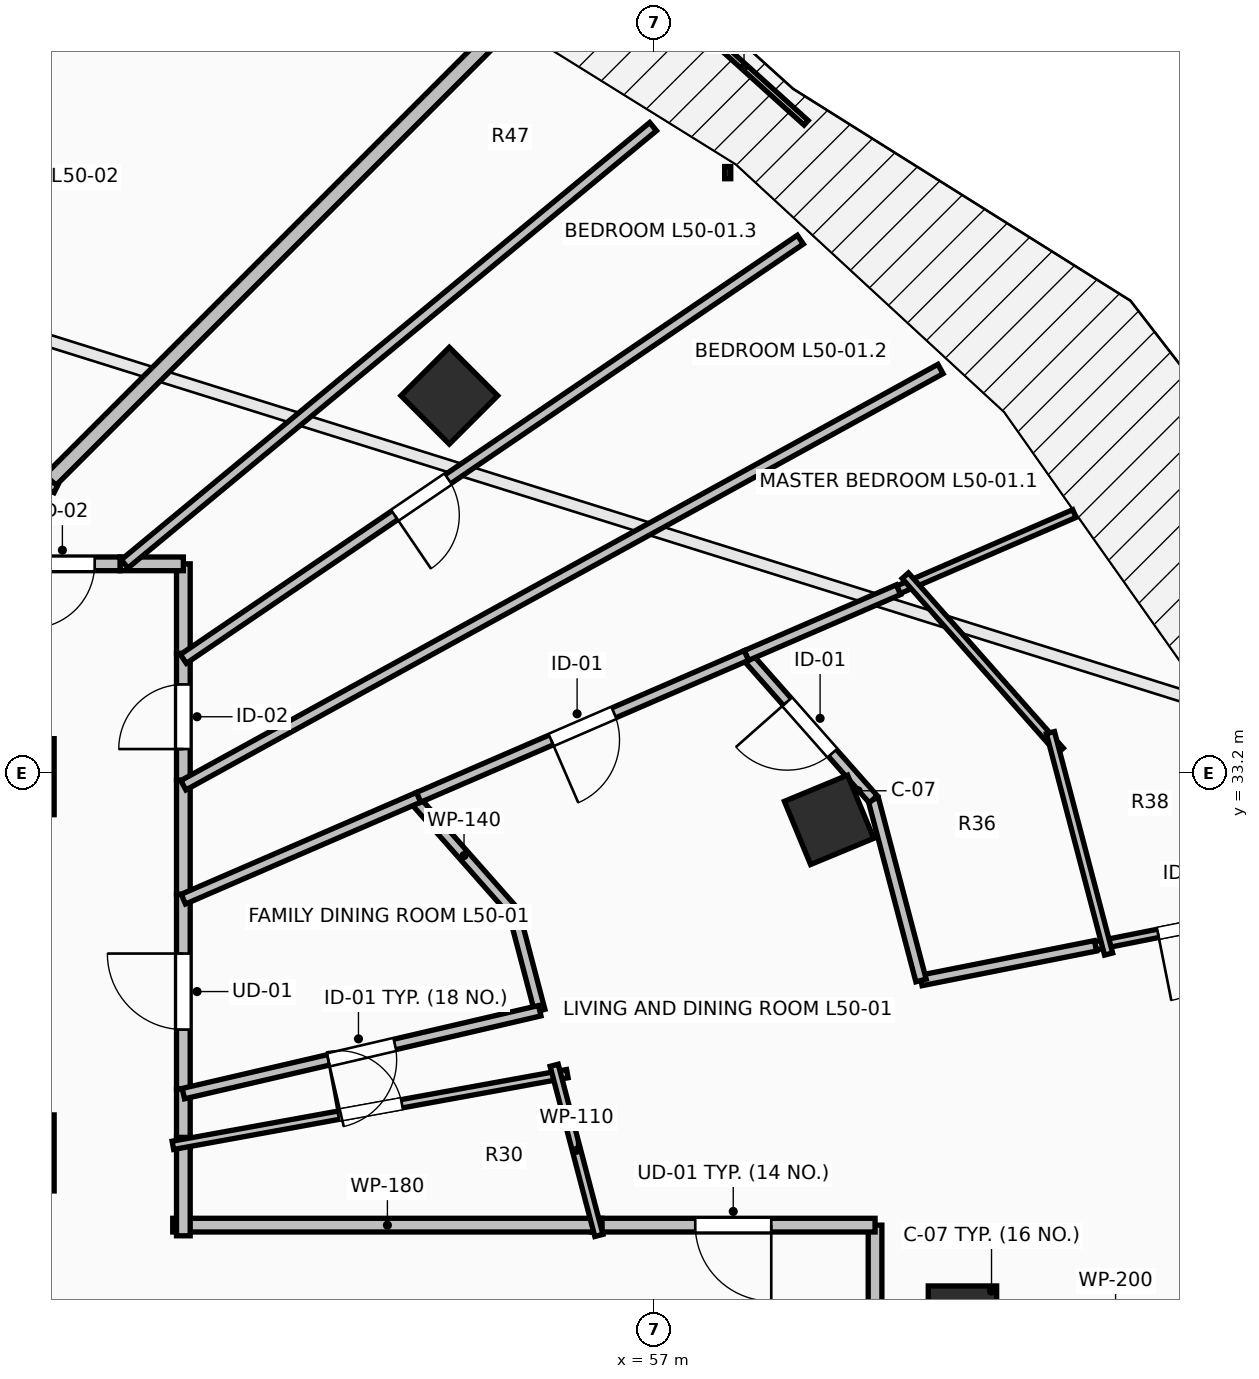
"""IFC4 building model, lengths in metres.
Left out: names, types, materials, properties, quantities, classifications, styles, units other than length and angle.
Written with IfcOpenShell. Run it as: python <this file> out.ifc"""

import sys

from ifc_helpers import new_model, si_unit, direction, frame, frame_2d, origin, origin_2d, place, context, subcontext, project, spatial, rectangle, extrude, element, fill, save


model = new_model("IFC4")
c1 = context("Model", 3, precision=1e-05, world=origin(), true_north=direction((0.0, 1.0)))
c2 = subcontext(c1, "Body", "Model", "MODEL_VIEW")
j1 = project(units=[si_unit("LENGTHUNIT", "METRE"), si_unit("PLANEANGLEUNIT", "RADIAN")], contexts=[c1])
p1 = place(None, origin())
s1 = spatial("IfcSite", under=j1, at=p1, CompositionType="ELEMENT")
p2 = place(p1, origin())
s2 = spatial("IfcBuilding", under=s1, at=p2, CompositionType="ELEMENT")
p3 = place(p2, frame((0.0, 0.0, 186.1)))
s3 = spatial("IfcBuildingStorey", under=s2, at=p3, CompositionType="ELEMENT", Elevation=186.1)
for number, where, z_axis, x_axis in (
    (1, (61.05, 26.0, 0.0), (0.0, 0.0, 1.0), (1.0, 0.0, 0.0)),
    (2, (59.295, 32.582, 0.0), (0.0, 0.0, 1.0), (0.924, 0.383, 0.0)),
    (3, (54.299, 38.162, 0.0), (0.0, 0.0, 1.0), (0.707, 0.707, 0.0)),
):
    element("IfcColumn", number, at=place(p3, frame(where, z_axis=z_axis, x_axis=x_axis)), inside=s3, PredefinedType="COLUMN", context=c2, shape_type="SweptSolid", body=[
        extrude(rectangle(XDim=0.9, YDim=0.9, at=origin_2d()), origin(), (0.0, 0.0, 1.0), 3.5),
    ])
for number, where, z_axis, x_axis in (
    (4, (48.75, 33.15, 0.0), (0.0, 0.0, 1.0), (1.0, 0.0, 0.0)),
    (5, (48.75, 28.2, 0.0), (0.0, 0.0, 1.0), (1.0, 0.0, 0.0)),
):
    element("IfcColumn", number, at=place(p3, frame(where, z_axis=z_axis, x_axis=x_axis)), inside=s3, PredefinedType="PILASTER", context=c2, shape_type="SweptSolid", body=[
        extrude(rectangle(XDim=0.7, YDim=1.0, at=origin_2d()), origin(), (0.0, 0.0, 1.0), 3.5),
    ])
p4 = place(p3, frame((59.9, 25.94, 0.0), z_axis=(0.0, 0.0, 1.0), x_axis=(0.0, 1.0, 0.0)))
e6 = element("IfcWall", 6, at=p4, inside=s3, PredefinedType="PARTITIONING", context=c2, shape_type="SweptSolid", body=[
    extrude(rectangle(XDim=1.31, YDim=0.18, at=frame_2d((0.655, 0.0))), origin(), (0.0, 0.0, 1.0), 2.432),
])
p5 = place(p3, frame((59.9, 27.25, 0.0), z_axis=(0.0, 0.0, 1.0), x_axis=(-1.0, 0.0, 0.0)))
e7 = element("IfcWall", 7, at=p5, inside=s3, PredefinedType="PARTITIONING", context=c2, shape_type="SweptSolid", body=[
    extrude(rectangle(XDim=3.731, YDim=0.18, at=frame_2d((1.865, 0.0))), origin(), (0.0, 0.0, 1.0), 2.874),
])
p6 = place(p5, frame((1.365, 0.0, 0.0)))
e8 = element("IfcOpeningElement", 8, at=p6, cuts=e7, PredefinedType="OPENING", context=c2, shape_type="SweptSolid", body=[
    extrude(rectangle(XDim=1.0, YDim=2.15, at=frame_2d((0.5, 1.075))), frame((0.0, 0.105, 0.0), z_axis=(0.0, -1.0, 0.0), x_axis=(1.0, 0.0, 0.0)), (0.0, 0.0, 1.0), 0.21),
])
p7 = place(p3, frame((50.8, 28.265, 0.0), z_axis=(0.0, 0.0, 1.0), x_axis=(0.0, 1.0, 0.0)))
e9 = element("IfcWall", 9, at=p7, inside=s3, PredefinedType="PARTITIONING", context=c2, shape_type="SweptSolid", body=[
    extrude(rectangle(XDim=0.777, YDim=0.18, at=frame_2d((0.389, 0.0))), origin(), (0.0, 0.0, 1.0), 3.24),
])
p8 = place(p3, frame((50.8, 29.042, 0.0), z_axis=(0.0, 0.0, 1.0), x_axis=(0.0, 1.0, 0.0)))
e10 = element("IfcWall", 10, at=p8, inside=s3, PredefinedType="PARTITIONING", context=c2, shape_type="SweptSolid", body=[
    extrude(rectangle(XDim=2.562, YDim=0.18, at=frame_2d((1.281, 0.0))), origin(), (0.0, 0.0, 1.0), 3.24),
])
p9 = place(p8, frame((0.781, 0.0, 0.0)))
e11 = element("IfcOpeningElement", 11, at=p9, cuts=e10, PredefinedType="OPENING", context=c2, shape_type="SweptSolid", body=[
    extrude(rectangle(XDim=1.0, YDim=2.15, at=frame_2d((0.5, 1.075))), frame((0.0, 0.105, 0.0), z_axis=(0.0, -1.0, 0.0), x_axis=(1.0, 0.0, 0.0)), (0.0, 0.0, 1.0), 0.21),
])
p10 = place(p3, frame((56.309, 27.25, 0.0), z_axis=(0.0, 0.0, 1.0), x_axis=(-1.0, 0.0, 0.0)))
e12 = element("IfcWall", 12, at=p10, inside=s3, PredefinedType="PARTITIONING", context=c2, shape_type="SweptSolid", body=[
    extrude(rectangle(XDim=5.649, YDim=0.18, at=frame_2d((2.825, 0.0))), origin(), (0.0, 0.0, 1.0), 2.432),
])
p11 = place(p3, frame((50.8, 27.11, 0.0), z_axis=(0.0, 0.0, 1.0), x_axis=(0.0, 1.0, 0.0)))
e13 = element("IfcWall", 13, at=p11, inside=s3, PredefinedType="PARTITIONING", context=c2, shape_type="SweptSolid", body=[
    extrude(rectangle(XDim=1.295, YDim=0.18, at=frame_2d((0.647, 0.0))), origin(), (0.0, 0.0, 1.0), 2.432),
])
p12 = place(p3, frame((50.8, 31.604, 0.0), z_axis=(0.0, 0.0, 1.0), x_axis=(0.0, 1.0, 0.0)))
e14 = element("IfcWall", 14, at=p12, inside=s3, PredefinedType="PARTITIONING", context=c2, shape_type="SweptSolid", body=[
    extrude(rectangle(XDim=1.501, YDim=0.18, at=frame_2d((0.75, 0.0))), origin(), (0.0, 0.0, 1.0), 2.432),
])
p13 = place(p3, frame((50.8, 33.105, 0.0), z_axis=(0.0, 0.0, 1.0), x_axis=(0.0, 1.0, 0.0)))
e15 = element("IfcWall", 15, at=p13, inside=s3, PredefinedType="PARTITIONING", context=c2, shape_type="SweptSolid", body=[
    extrude(rectangle(XDim=1.667, YDim=0.18, at=frame_2d((0.833, 0.0))), origin(), (0.0, 0.0, 1.0), 2.432),
])
p14 = place(p13, frame((0.408, 0.0, 0.0)))
e16 = element("IfcOpeningElement", 16, at=p14, cuts=e15, PredefinedType="OPENING", context=c2, shape_type="SweptSolid", body=[
    extrude(rectangle(XDim=0.85, YDim=2.1, at=frame_2d((0.425, 1.05))), frame((0.0, 0.105, 0.0), z_axis=(0.0, -1.0, 0.0), x_axis=(1.0, 0.0, 0.0)), (0.0, 0.0, 1.0), 0.21),
])
p15 = place(p3, frame((50.8, 34.772, 0.0), z_axis=(0.0, 0.0, 1.0), x_axis=(0.0, 1.0, 0.0)))
e17 = element("IfcWall", 17, at=p15, inside=s3, PredefinedType="PARTITIONING", context=c2, shape_type="SweptSolid", body=[
    extrude(rectangle(XDim=1.178, YDim=0.18, at=frame_2d((0.589, 0.0))), origin(), (0.0, 0.0, 1.0), 2.432),
])
p16 = place(p3, frame((50.8, 35.95, 0.0), z_axis=(0.0, 0.0, 1.0), x_axis=(-1.0, 0.0, 0.0)))
e18 = element("IfcWall", 18, at=p16, inside=s3, PredefinedType="PARTITIONING", context=c2, shape_type="SweptSolid", body=[
    extrude(rectangle(XDim=0.833, YDim=0.18, at=frame_2d((0.417, 0.0))), origin(), (0.0, 0.0, 1.0), 3.24),
])
p17 = place(p3, frame((49.967, 35.95, 0.0), z_axis=(0.0, 0.0, 1.0), x_axis=(-1.0, 0.0, 0.0)))
e19 = element("IfcWall", 19, at=p17, inside=s3, PredefinedType="PARTITIONING", context=c2, shape_type="SweptSolid", body=[
    extrude(rectangle(XDim=2.077, YDim=0.18, at=frame_2d((1.039, 0.0))), origin(), (0.0, 0.0, 1.0), 2.432),
])
p18 = place(p17, frame((0.333, 0.0, 0.0)))
e20 = element("IfcOpeningElement", 20, at=p18, cuts=e19, PredefinedType="OPENING", context=c2, shape_type="SweptSolid", body=[
    extrude(rectangle(XDim=0.85, YDim=2.1, at=frame_2d((0.425, 1.05))), frame((0.0, 0.105, 0.0), z_axis=(0.0, -1.0, 0.0), x_axis=(1.0, 0.0, 0.0)), (0.0, 0.0, 1.0), 0.21),
])
p19 = place(p3, frame((53.838, 32.853, 0.0), z_axis=(0.0, 0.0, 1.0), x_axis=(0.662046229388, -0.749463001191, 0.0)))
e21 = element("IfcWall", 21, at=p19, inside=s3, PredefinedType="PARTITIONING", context=c2, shape_type="SweptSolid", body=[
    extrude(rectangle(XDim=1.977, YDim=0.14, at=frame_2d((0.989, 0.0))), origin(), (0.0, 0.0, 1.0), 2.432),
])
p20 = place(p3, frame((55.147, 31.371, 0.0), z_axis=(0.0, 0.0, 1.0), x_axis=(0.25443966192, -0.967088650767, 0.0)))
e22 = element("IfcWall", 22, at=p20, inside=s3, PredefinedType="PARTITIONING", context=c2, shape_type="SweptSolid", body=[
    extrude(rectangle(XDim=1.344, YDim=0.14, at=frame_2d((0.672, 0.0))), origin(), (0.0, 0.0, 1.0), 3.24),
])
p21 = place(p3, frame((55.489, 30.071, 0.0), z_axis=(0.0, 0.0, 1.0), x_axis=(-0.973980178663, -0.226633209333, 0.0)))
e23 = element("IfcWall", 23, at=p21, inside=s3, PredefinedType="PARTITIONING", context=c2, shape_type="SweptSolid", body=[
    extrude(rectangle(XDim=4.814, YDim=0.14, at=frame_2d((2.407, 0.0))), origin(), (0.0, 0.0, 1.0), 2.922),
])
p22 = place(p21, frame((1.957, 0.0, 0.0)))
e24 = element("IfcOpeningElement", 24, at=p22, cuts=e23, PredefinedType="OPENING", context=c2, shape_type="SweptSolid", body=[
    extrude(rectangle(XDim=0.9, YDim=2.1, at=frame_2d((0.45, 1.05))), frame((0.0, 0.085, 0.0), z_axis=(0.0, -1.0, 0.0), x_axis=(1.0, 0.0, 0.0)), (0.0, 0.0, 1.0), 0.17),
])
p23 = place(p3, frame((53.896, 32.879, 0.0), z_axis=(0.0, 0.0, 1.0), x_axis=(-0.917742985146, -0.39717478925, 0.0)))
e25 = element("IfcWall", 25, at=p23, inside=s3, PredefinedType="PARTITIONING", context=c2, shape_type="SweptSolid", body=[
    extrude(rectangle(XDim=3.374, YDim=0.14, at=frame_2d((1.687, 0.0))), origin(), (0.0, 0.0, 1.0), 2.432),
])
p24 = place(p3, frame((50.662, 28.3, 0.0), z_axis=(0.0, 0.0, 1.0), x_axis=(0.983892120625, 0.178763237197, 0.0)))
e26 = element("IfcWall", 26, at=p24, inside=s3, PredefinedType="PARTITIONING", context=c2, shape_type="SweptSolid", body=[
    extrude(rectangle(XDim=5.274, YDim=0.11, at=frame_2d((2.637, 0.0))), origin(), (0.0, 0.0, 1.0), 2.874),
])
p25 = place(p24, frame((2.212, 0.0, 0.0)))
e27 = element("IfcOpeningElement", 27, at=p25, cuts=e26, PredefinedType="OPENING", context=c2, shape_type="SweptSolid", body=[
    extrude(rectangle(XDim=0.85, YDim=2.1, at=frame_2d((0.425, 1.05))), frame((0.0, 0.07, 0.0), z_axis=(0.0, -1.0, 0.0), x_axis=(1.0, 0.0, 0.0)), (0.0, 0.0, 1.0), 0.14),
])
p26 = place(p3, frame((55.678, 29.354, 0.0), z_axis=(0.0, 0.0, 1.0), x_axis=(0.254057219361, -0.96718919002, 0.0)))
e28 = element("IfcWall", 28, at=p26, inside=s3, PredefinedType="PARTITIONING", context=c2, shape_type="SweptSolid", body=[
    extrude(rectangle(XDim=2.315, YDim=0.11, at=frame_2d((1.157, 0.0))), origin(), (0.0, 0.0, 1.0), 2.432),
])
p27 = place(p3, frame((65.327, 31.427, 0.0), z_axis=(0.0, 0.0, 1.0), x_axis=(-0.980809558385, -0.194968228644, 0.0)))
e29 = element("IfcWall", 29, at=p27, inside=s3, PredefinedType="PARTITIONING", context=c2, shape_type="SweptSolid", body=[
    extrude(rectangle(XDim=2.577, YDim=0.11, at=frame_2d((1.289, 0.0))), origin(), (0.0, 0.0, 1.0), 3.24),
])
p28 = place(p27, frame((0.838, 0.0, 0.0)))
e30 = element("IfcOpeningElement", 30, at=p28, cuts=e29, PredefinedType="OPENING", context=c2, shape_type="SweptSolid", body=[
    extrude(rectangle(XDim=0.9, YDim=2.1, at=frame_2d((0.45, 1.05))), frame((0.0, 0.07, 0.0), z_axis=(0.0, -1.0, 0.0), x_axis=(1.0, 0.0, 0.0)), (0.0, 0.0, 1.0), 0.14),
])
p29 = place(p3, frame((60.208, 35.609, 0.0), z_axis=(0.0, 0.0, 1.0), x_axis=(0.917692098887, 0.397292350341, 0.0)))
e31 = element("IfcWall", 31, at=p29, inside=s3, PredefinedType="PARTITIONING", context=c2, shape_type="SweptSolid", body=[
    extrude(rectangle(XDim=2.522, YDim=0.11, at=frame_2d((1.261, 0.0))), origin(), (0.0, 0.0, 1.0), 3.24),
])
p30 = place(p3, frame((62.8, 30.925, 0.0), z_axis=(0.0, 0.0, 1.0), x_axis=(-0.980840670114, -0.194811652245, 0.0)))
e32 = element("IfcWall", 32, at=p30, inside=s3, PredefinedType="PARTITIONING", context=c2, shape_type="SweptSolid", body=[
    extrude(rectangle(XDim=2.34, YDim=0.14, at=frame_2d((1.17, 0.0))), origin(), (0.0, 0.0, 1.0), 3.24),
])
p31 = place(p3, frame((60.505, 30.469, 0.0), z_axis=(0.0, 0.0, 1.0), x_axis=(-0.254702896388, 0.967019355841, 0.0)))
e33 = element("IfcWall", 33, at=p31, inside=s3, PredefinedType="PARTITIONING", context=c2, shape_type="SweptSolid", body=[
    extrude(rectangle(XDim=2.465, YDim=0.14, at=frame_2d((1.233, 0.0))), origin(), (0.0, 0.0, 1.0), 3.24),
])
p32 = place(p3, frame((59.877, 32.853, 0.0), z_axis=(0.0, 0.0, 1.0), x_axis=(-0.661957655691, 0.749541234404, 0.0)))
e34 = element("IfcWall", 34, at=p32, inside=s3, PredefinedType="PARTITIONING", context=c2, shape_type="SweptSolid", body=[
    extrude(rectangle(XDim=2.523, YDim=0.14, at=frame_2d((1.261, 0.0))), origin(), (0.0, 0.0, 1.0), 3.24),
])
p33 = place(p32, frame((0.811, 0.0, 0.0)))
e35 = element("IfcOpeningElement", 35, at=p33, cuts=e34, PredefinedType="OPENING", context=c2, shape_type="SweptSolid", body=[
    extrude(rectangle(XDim=0.9, YDim=2.1, at=frame_2d((0.45, 1.05))), frame((0.0, 0.085, 0.0), z_axis=(0.0, -1.0, 0.0), x_axis=(1.0, 0.0, 0.0)), (0.0, 0.0, 1.0), 0.17),
])
p34 = place(p3, frame((58.207, 34.744, 0.0), z_axis=(0.0, 0.0, 1.0), x_axis=(0.917748928086, 0.397161056748, 0.0)))
e36 = element("IfcWall", 36, at=p34, inside=s3, PredefinedType="PARTITIONING", context=c2, shape_type="SweptSolid", body=[
    extrude(rectangle(XDim=2.18, YDim=0.14, at=frame_2d((1.09, 0.0))), origin(), (0.0, 0.0, 1.0), 3.24),
])
p35 = place(p3, frame((58.207, 34.744, 0.0), z_axis=(0.0, 0.0, 1.0), x_axis=(-0.917771035239, -0.397109968241, 0.0)))
e37 = element("IfcWall", 37, at=p35, inside=s3, PredefinedType="PARTITIONING", context=c2, shape_type="SweptSolid", body=[
    extrude(rectangle(XDim=4.697, YDim=0.14, at=frame_2d((2.349, 0.0))), origin(), (0.0, 0.0, 1.0), 2.432),
])
p36 = place(p35, frame((1.898, 0.0, 0.0)))
e38 = element("IfcOpeningElement", 38, at=p36, cuts=e37, PredefinedType="OPENING", context=c2, shape_type="SweptSolid", body=[
    extrude(rectangle(XDim=0.9, YDim=2.1, at=frame_2d((0.45, 1.05))), frame((0.0, 0.085, 0.0), z_axis=(0.0, -1.0, 0.0), x_axis=(1.0, 0.0, 0.0)), (0.0, 0.0, 1.0), 0.17),
])
p37 = place(p3, frame((60.298, 35.794, 0.0), z_axis=(0.0, 0.0, 1.0), x_axis=(0.662277588726, -0.74925856383, 0.0)))
e39 = element("IfcWall", 39, at=p37, inside=s3, PredefinedType="PARTITIONING", context=c2, shape_type="SweptSolid", body=[
    extrude(rectangle(XDim=3.076, YDim=0.11, at=frame_2d((1.538, 0.0))), origin(), (0.0, 0.0, 1.0), 3.24),
])
p38 = place(p3, frame((62.208, 33.729, 0.0), z_axis=(0.0, 0.0, 1.0), x_axis=(0.254058335644, -0.967188896798, 0.0)))
e40 = element("IfcWall", 40, at=p38, inside=s3, PredefinedType="PARTITIONING", context=c2, shape_type="SweptSolid", body=[
    extrude(rectangle(XDim=3.012, YDim=0.11, at=frame_2d((1.506, 0.0))), origin(), (0.0, 0.0, 1.0), 3.24),
])
p39 = place(p3, frame((60.761, 38.513, 0.0), z_axis=(0.0, 0.0, 1.0), x_axis=(-0.876315654865, -0.481737348602, 0.0)))
e41 = element("IfcWall", 41, at=p39, inside=s3, PredefinedType="PARTITIONING", context=c2, shape_type="SweptSolid", body=[
    extrude(rectangle(XDim=11.367, YDim=0.14, at=frame_2d((5.684, 0.0))), origin(), (0.0, 0.0, 1.0), 2.432),
])
p40 = place(p3, frame((58.917, 40.215, 0.0), z_axis=(0.0, 0.0, 1.0), x_axis=(-0.827087951184, -0.562072522906, 0.0)))
e42 = element("IfcWall", 42, at=p40, inside=s3, PredefinedType="PARTITIONING", context=c2, shape_type="SweptSolid", body=[
    extrude(rectangle(XDim=9.814, YDim=0.14, at=frame_2d((4.907, 0.0))), origin(), (0.0, 0.0, 1.0), 2.432),
])
p41 = place(p40, frame((5.602, 0.0, 0.0)))
e43 = element("IfcOpeningElement", 43, at=p41, cuts=e42, PredefinedType="OPENING", context=c2, shape_type="SweptSolid", body=[
    extrude(rectangle(XDim=0.85, YDim=2.1, at=frame_2d((0.425, 1.05))), frame((0.0, 0.085, 0.0), z_axis=(0.0, -1.0, 0.0), x_axis=(1.0, 0.0, 0.0)), (0.0, 0.0, 1.0), 0.17),
])
p42 = place(p3, frame((56.98, 41.702, 0.0), z_axis=(0.0, 0.0, 1.0), x_axis=(-0.770511618294, -0.637425953405, 0.0)))
e44 = element("IfcWall", 44, at=p42, inside=s3, PredefinedType="PARTITIONING", context=c2, shape_type="SweptSolid", body=[
    extrude(rectangle(XDim=9.024, YDim=0.14, at=frame_2d((4.512, 0.0))), origin(), (0.0, 0.0, 1.0), 2.774),
])
p43 = place(p3, frame((54.959, 42.959, 0.0), z_axis=(0.0, 0.0, 1.0), x_axis=(-0.707106781187, -0.707106781187, 0.0)))
e45 = element("IfcWall", 45, at=p43, inside=s3, PredefinedType="PARTITIONING", context=c2, shape_type="SweptSolid", body=[
    extrude(rectangle(XDim=8.492, YDim=0.2, at=frame_2d((4.246, 0.0))), origin(), (0.0, 0.0, 1.0), 2.774),
])
p44 = place(p3, frame((49.053, 37.053, 0.0), z_axis=(0.0, 0.0, 1.0), x_axis=(-0.707106781187, -0.707106781187, 0.0)))
e46 = element("IfcWall", 46, at=p44, inside=s3, PredefinedType="PARTITIONING", context=c2, shape_type="SweptSolid", body=[
    extrude(rectangle(XDim=1.7, YDim=0.2, at=frame_2d((0.85, 0.0))), origin(), (0.0, 0.0, 1.0), 2.432),
])
p45 = place(p3, frame((46.369, 38.328, 0.0), z_axis=(0.0, 0.0, 1.0), x_axis=(0.892472891666, -0.451101028199, 0.0)))
e47 = element("IfcWall", 47, at=p45, inside=s3, PredefinedType="PARTITIONING", context=c2, shape_type="SweptSolid", body=[
    extrude(rectangle(XDim=3.086, YDim=0.11, at=frame_2d((1.543, 0.0))), origin(), (0.0, 0.0, 1.0), 2.432),
])
p46 = place(p6, origin())
e48 = element("IfcDoor", 48, at=p46, inside=s3, OperationType="SINGLE_SWING_LEFT", PredefinedType="DOOR", context=c2, shape_type="SweptSolid", body=[
    extrude(rectangle(XDim=1.0, YDim=2.15, at=frame_2d((0.5, 1.075))), frame((0.0, 0.025, 0.0), z_axis=(0.0, -1.0, 0.0), x_axis=(1.0, 0.0, 0.0)), (0.0, 0.0, 1.0), 0.05),
])
fill(e8, e48)
p47 = place(p9, origin())
e49 = element("IfcDoor", 49, at=p47, inside=s3, OperationType="SINGLE_SWING_RIGHT", PredefinedType="DOOR", context=c2, shape_type="SweptSolid", body=[
    extrude(rectangle(XDim=1.0, YDim=2.15, at=frame_2d((0.5, 1.075))), frame((0.0, 0.025, 0.0), z_axis=(0.0, -1.0, 0.0), x_axis=(1.0, 0.0, 0.0)), (0.0, 0.0, 1.0), 0.05),
])
fill(e11, e49)
p48 = place(p22, origin())
e50 = element("IfcDoor", 50, at=p48, inside=s3, OperationType="SINGLE_SWING_RIGHT", PredefinedType="DOOR", context=c2, shape_type="SweptSolid", body=[
    extrude(rectangle(XDim=0.9, YDim=2.1, at=frame_2d((0.45, 1.05))), frame((0.0, 0.025, 0.0), z_axis=(0.0, -1.0, 0.0), x_axis=(1.0, 0.0, 0.0)), (0.0, 0.0, 1.0), 0.05),
])
fill(e24, e50)
p49 = place(p25, origin())
e51 = element("IfcDoor", 51, at=p49, inside=s3, OperationType="SINGLE_SWING_LEFT", PredefinedType="DOOR", context=c2, shape_type="SweptSolid", body=[
    extrude(rectangle(XDim=0.85, YDim=2.1, at=frame_2d((0.425, 1.05))), frame((0.0, 0.025, 0.0), z_axis=(0.0, -1.0, 0.0), x_axis=(1.0, 0.0, 0.0)), (0.0, 0.0, 1.0), 0.05),
])
fill(e27, e51)
p50 = place(p28, origin())
e52 = element("IfcDoor", 52, at=p50, inside=s3, OperationType="SINGLE_SWING_RIGHT", PredefinedType="DOOR", context=c2, shape_type="SweptSolid", body=[
    extrude(rectangle(XDim=0.9, YDim=2.1, at=frame_2d((0.45, 1.05))), frame((0.0, 0.025, 0.0), z_axis=(0.0, -1.0, 0.0), x_axis=(1.0, 0.0, 0.0)), (0.0, 0.0, 1.0), 0.05),
])
fill(e30, e52)
p51 = place(p33, origin())
e53 = element("IfcDoor", 53, at=p51, inside=s3, OperationType="SINGLE_SWING_RIGHT", PredefinedType="DOOR", context=c2, shape_type="SweptSolid", body=[
    extrude(rectangle(XDim=0.9, YDim=2.1, at=frame_2d((0.45, 1.05))), frame((0.0, 0.025, 0.0), z_axis=(0.0, -1.0, 0.0), x_axis=(1.0, 0.0, 0.0)), (0.0, 0.0, 1.0), 0.05),
])
fill(e35, e53)
p52 = place(p36, origin())
e54 = element("IfcDoor", 54, at=p52, inside=s3, OperationType="SINGLE_SWING_RIGHT", PredefinedType="DOOR", context=c2, shape_type="SweptSolid", body=[
    extrude(rectangle(XDim=0.9, YDim=2.1, at=frame_2d((0.45, 1.05))), frame((0.0, 0.025, 0.0), z_axis=(0.0, -1.0, 0.0), x_axis=(1.0, 0.0, 0.0)), (0.0, 0.0, 1.0), 0.05),
])
fill(e38, e54)
p53 = place(p14, origin())
e55 = element("IfcDoor", 55, at=p53, inside=s3, OperationType="SINGLE_SWING_LEFT", PredefinedType="DOOR", context=c2, shape_type="SweptSolid", body=[
    extrude(rectangle(XDim=0.85, YDim=2.1, at=frame_2d((0.425, 1.05))), frame((0.0, 0.025, 0.0), z_axis=(0.0, -1.0, 0.0), x_axis=(1.0, 0.0, 0.0)), (0.0, 0.0, 1.0), 0.05),
])
fill(e16, e55)
p54 = place(p18, origin())
e56 = element("IfcDoor", 56, at=p54, inside=s3, OperationType="SINGLE_SWING_RIGHT", PredefinedType="DOOR", context=c2, shape_type="SweptSolid", body=[
    extrude(rectangle(XDim=0.85, YDim=2.1, at=frame_2d((0.425, 1.05))), frame((0.0, 0.025, 0.0), z_axis=(0.0, -1.0, 0.0), x_axis=(1.0, 0.0, 0.0)), (0.0, 0.0, 1.0), 0.05),
])
fill(e20, e56)
p55 = place(p41, origin())
e57 = element("IfcDoor", 57, at=p55, inside=s3, OperationType="SINGLE_SWING_RIGHT", PredefinedType="DOOR", context=c2, shape_type="SweptSolid", body=[
    extrude(rectangle(XDim=0.85, YDim=2.1, at=frame_2d((0.425, 1.05))), frame((0.0, 0.025, 0.0), z_axis=(0.0, -1.0, 0.0), x_axis=(1.0, 0.0, 0.0)), (0.0, 0.0, 1.0), 0.05),
])
fill(e43, e57)
save(model, sys.argv[1])
